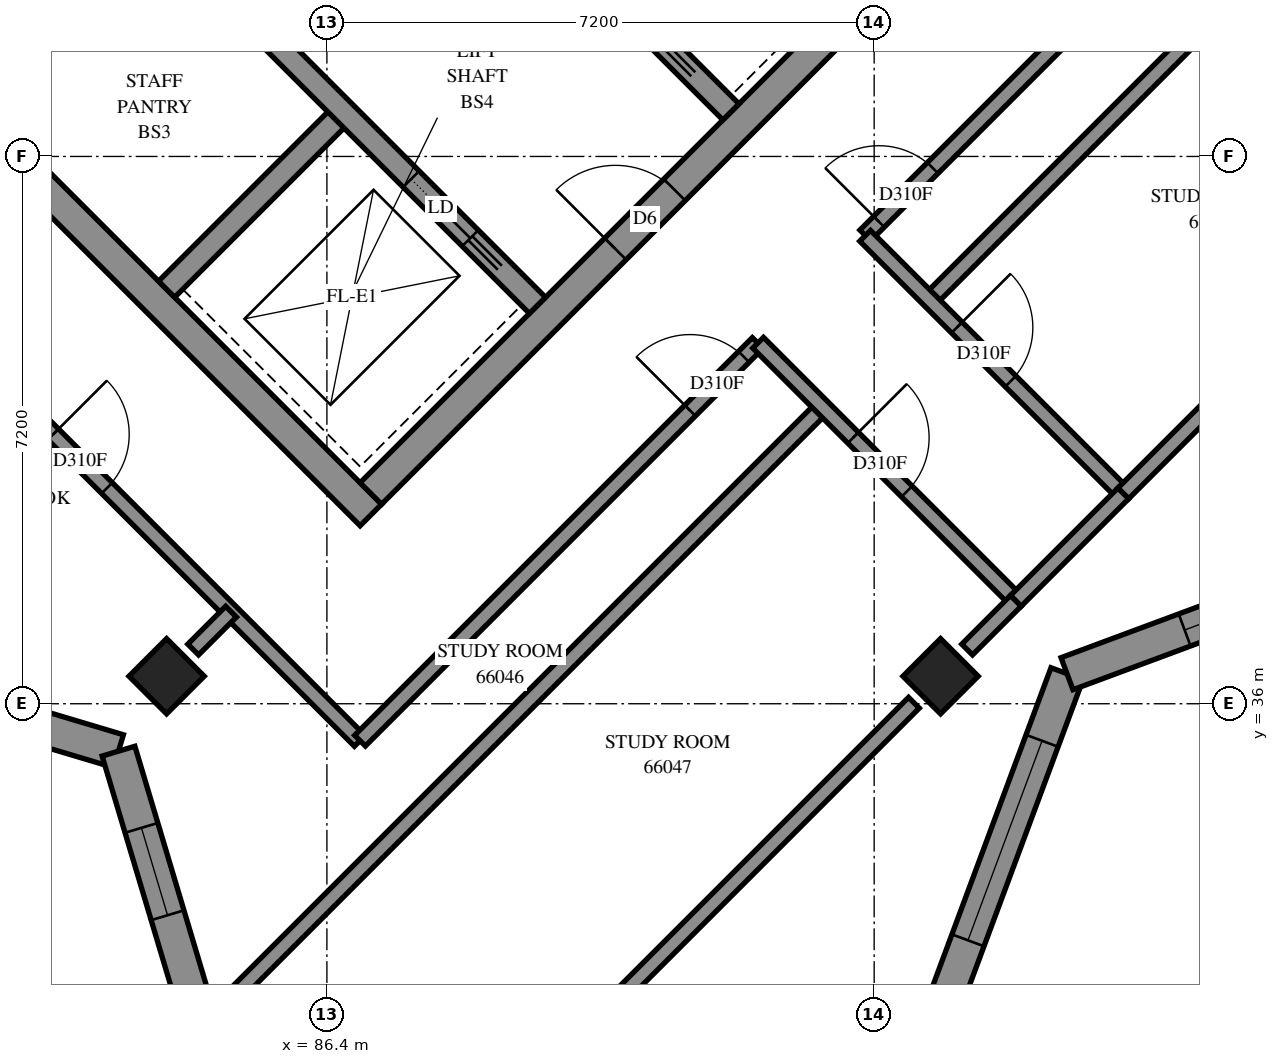
"""IFC4 building model, lengths in metres.
Left out: names, types, materials, properties, quantities, classifications, styles, units other than length and angle.
Written with IfcOpenShell. Run it as: python <this file> out.ifc"""

import sys

from ifc_helpers import new_model, si_unit, direction, frame, frame_2d, origin, origin_2d, place, context, subcontext, project, spatial, polyline, rectangle, outline, extrude, element, fill, save


model = new_model("IFC4")
c1 = context("Model", 3, precision=1e-05, world=origin(), true_north=direction((0.0, 1.0)))
c2 = subcontext(c1, "Body", "Model", "MODEL_VIEW")
j1 = project(units=[si_unit("LENGTHUNIT", "METRE"), si_unit("PLANEANGLEUNIT", "RADIAN")], contexts=[c1])
p1 = place(None, origin())
s1 = spatial("IfcSite", under=j1, at=p1, CompositionType="ELEMENT")
p2 = place(p1, origin())
s2 = spatial("IfcBuilding", under=s1, at=p2, CompositionType="ELEMENT")
p3 = place(p2, frame((0.0, 0.0, 243.8)))
s3 = spatial("IfcBuildingStorey", under=s2, at=p3, CompositionType="ELEMENT", Elevation=243.8)
for number, where, z_axis, x_axis in (
    (1, (84.291, 36.362, 0.0), (0.0, 0.0, 1.0), (0.707, -0.707, 0.0)),
    (2, (94.474, 36.362, 0.0), (0.0, 0.0, 1.0), (0.707, -0.707, 0.0)),
):
    element("IfcColumn", number, at=place(p3, frame(where, z_axis=z_axis, x_axis=x_axis)), inside=s3, PredefinedType="COLUMN", context=c2, shape_type="SweptSolid", body=[
        extrude(rectangle(XDim=0.7, YDim=0.7, at=origin_2d()), origin(), (0.0, 0.0, 1.0), 3.1),
    ])
p4 = place(p3, frame((76.23, 49.231, -0.3), z_axis=(0.0, 0.0, 1.0), x_axis=(0.7071034917, -0.7071100706, 0.0)))
e3 = element("IfcWall", 3, at=p4, inside=s3, PredefinedType="SHEAR", context=c2, shape_type="SweptSolid", body=[
    extrude(rectangle(XDim=15.2, YDim=0.4, at=frame_2d((7.6, 0.0))), origin(), (0.0, 0.0, 1.0), 2.7),
])
p5 = place(p3, frame((86.978, 38.766, -0.3), z_axis=(0.0, 0.0, 1.0), x_axis=(0.7071067812, 0.7071067812, 0.0)))
e4 = element("IfcWall", 4, at=p5, inside=s3, PredefinedType="SHEAR", context=c2, shape_type="SweptSolid", body=[
    extrude(rectangle(XDim=14.4, YDim=0.4, at=frame_2d((7.2, 0.0))), origin(), (0.0, 0.0, 1.0), 2.7),
])
p6 = place(p5, frame((4.55, 0.0, 0.3)))
e5 = element("IfcOpeningElement", 5, at=p6, cuts=e4, PredefinedType="OPENING", context=c2, shape_type="SweptSolid", body=[
    extrude(rectangle(XDim=1.1, YDim=2.1, at=frame_2d((0.55, 1.05))), frame((0.0, 0.21, 0.0), z_axis=(0.0, -1.0, 0.0), x_axis=(1.0, 0.0, 0.0)), (0.0, 0.0, 1.0), 0.42),
])
p7 = place(p5, frame((11.35, 0.0, 0.3)))
e6 = element("IfcOpeningElement", 6, at=p7, cuts=e4, PredefinedType="OPENING", context=c2, shape_type="SweptSolid", body=[
    extrude(rectangle(XDim=1.1, YDim=2.1, at=frame_2d((0.55, 1.05))), frame((0.0, 0.21, 0.0), z_axis=(0.0, -1.0, 0.0), x_axis=(1.0, 0.0, 0.0)), (0.0, 0.0, 1.0), 0.42),
])
for number, where, z_axis, x_axis in (
    (7, (81.746, 43.999, 0.0), (0.0, 0.0, 1.0), (0.707, 0.707, 0.0)),
    (8, (84.291, 41.453, 0.0), (0.0, 0.0, 1.0), (0.707, 0.707, 0.0)),
):
    element("IfcWall", number, at=place(p3, frame(where, z_axis=z_axis, x_axis=x_axis)), inside=s3, PredefinedType="SOLIDWALL", context=c2, shape_type="SweptSolid", body=[
        extrude(rectangle(XDim=3.3, YDim=0.3, at=frame_2d((1.65, 0.0))), origin(), (0.0, 0.0, 1.0), 3.1),
    ])
p8 = place(p3, frame((78.988, 51.423, 0.0), z_axis=(0.0, 0.0, 1.0), x_axis=(0.7071067812, -0.7071067812, 0.0)))
e9 = element("IfcWall", 9, at=p8, inside=s3, PredefinedType="SOLIDWALL", context=c2, shape_type="SweptSolid", body=[
    extrude(rectangle(XDim=14.4, YDim=0.3, at=frame_2d((7.2, 0.0))), origin(), (0.0, 0.0, 1.0), 3.1),
])
p9 = place(p8, frame((1.35, 0.0, 0.0)))
e10 = element("IfcOpeningElement", 10, at=p9, cuts=e9, PredefinedType="OPENING", context=c2, shape_type="SweptSolid", body=[
    extrude(rectangle(XDim=0.9, YDim=2.1, at=frame_2d((0.45, 1.05))), frame((0.0, 0.16, 0.0), z_axis=(0.0, -1.0, 0.0), x_axis=(1.0, 0.0, 0.0)), (0.0, 0.0, 1.0), 0.32),
])
p10 = place(p8, frame((4.95, 0.0, 0.0)))
e11 = element("IfcOpeningElement", 11, at=p10, cuts=e9, PredefinedType="OPENING", context=c2, shape_type="SweptSolid", body=[
    extrude(rectangle(XDim=0.9, YDim=2.1, at=frame_2d((0.45, 1.05))), frame((0.0, 0.16, 0.0), z_axis=(0.0, -1.0, 0.0), x_axis=(1.0, 0.0, 0.0)), (0.0, 0.0, 1.0), 0.32),
])
p11 = place(p8, frame((8.55, 0.0, 0.0)))
e12 = element("IfcOpeningElement", 12, at=p11, cuts=e9, PredefinedType="OPENING", context=c2, shape_type="SweptSolid", body=[
    extrude(rectangle(XDim=0.9, YDim=2.1, at=frame_2d((0.45, 1.05))), frame((0.0, 0.16, 0.0), z_axis=(0.0, -1.0, 0.0), x_axis=(1.0, 0.0, 0.0)), (0.0, 0.0, 1.0), 0.32),
])
p12 = place(p8, frame((12.05, 0.0, 0.0)))
e13 = element("IfcOpeningElement", 13, at=p12, cuts=e9, PredefinedType="OPENING", context=c2, shape_type="SweptSolid", body=[
    extrude(rectangle(XDim=1.1, YDim=2.1, at=frame_2d((0.55, 1.05))), frame((0.0, 0.16, 0.0), z_axis=(0.0, -1.0, 0.0), x_axis=(1.0, 0.0, 0.0)), (0.0, 0.0, 1.0), 0.32),
])
p13 = place(p3, frame((81.534, 53.969, 0.0), z_axis=(0.0, 0.0, 1.0), x_axis=(0.707103309, -0.7071102534, 0.0)))
e14 = element("IfcWall", 14, at=p13, inside=s3, PredefinedType="SOLIDWALL", context=c2, shape_type="SweptSolid", body=[
    extrude(rectangle(XDim=14.4, YDim=0.3, at=frame_2d((7.2, 0.0))), origin(), (0.0, 0.0, 1.0), 3.1),
])
p14 = place(p13, frame((8.55, 0.0, 0.0)))
e15 = element("IfcOpeningElement", 15, at=p14, cuts=e14, PredefinedType="OPENING", context=c2, shape_type="SweptSolid", body=[
    extrude(rectangle(XDim=0.9, YDim=2.1, at=frame_2d((0.45, 1.05))), frame((0.0, 0.16, 0.0), z_axis=(0.0, -1.0, 0.0), x_axis=(1.0, 0.0, 0.0)), (0.0, 0.0, 1.0), 0.32),
])
p15 = place(p13, frame((1.25, 0.0, 0.0)))
e16 = element("IfcOpeningElement", 16, at=p15, cuts=e14, PredefinedType="OPENING", context=c2, shape_type="SweptSolid", body=[
    extrude(rectangle(XDim=1.1, YDim=2.1, at=frame_2d((0.55, 1.05))), frame((0.0, 0.16, 0.0), z_axis=(0.0, -1.0, 0.0), x_axis=(1.0, 0.0, 0.0)), (0.0, 0.0, 1.0), 0.32),
])
p16 = place(p13, frame((4.85, 0.0, 0.0)))
e17 = element("IfcOpeningElement", 17, at=p16, cuts=e14, PredefinedType="OPENING", context=c2, shape_type="SweptSolid", body=[
    extrude(rectangle(XDim=1.1, YDim=2.1, at=frame_2d((0.55, 1.05))), frame((0.0, 0.16, 0.0), z_axis=(0.0, -1.0, 0.0), x_axis=(1.0, 0.0, 0.0)), (0.0, 0.0, 1.0), 0.32),
])
p17 = place(p13, frame((12.05, 0.0, 0.0)))
e18 = element("IfcOpeningElement", 18, at=p17, cuts=e14, PredefinedType="OPENING", context=c2, shape_type="SweptSolid", body=[
    extrude(rectangle(XDim=1.1, YDim=2.1, at=frame_2d((0.55, 1.05))), frame((0.0, 0.16, 0.0), z_axis=(0.0, -1.0, 0.0), x_axis=(1.0, 0.0, 0.0)), (0.0, 0.0, 1.0), 0.32),
])
p18 = place(p3, frame((94.3, 31.45, 0.0), z_axis=(0.0, 0.0, 1.0), x_axis=(0.3481927166, 0.9374229739, 0.0)))
e19 = element("IfcWall", 19, at=p18, inside=s3, PredefinedType="SOLIDWALL", context=c2, shape_type="SweptSolid", body=[
    extrude(outline(polyline([(-0.108, -0.225), (5.172, -0.225), (5.379, 0.225), (0.108, 0.225), (-0.108, -0.225)])), origin(), (0.0, 0.0, 1.0), 3.1),
])
p19 = place(p18, frame((1.534, 0.0, 0.45)))
e20 = element("IfcOpeningElement", 20, at=p19, cuts=e19, PredefinedType="OPENING", context=c2, shape_type="SweptSolid", body=[
    extrude(rectangle(XDim=2.8, YDim=2.55, at=frame_2d((1.4, 1.275))), frame((0.0, 0.235, 0.0), z_axis=(0.0, -1.0, 0.0), x_axis=(1.0, 0.0, 0.0)), (0.0, 0.0, 1.0), 0.47),
])
p20 = place(p3, frame((96.137, 36.395, 0.0), z_axis=(0.0, 0.0, 1.0), x_axis=(0.937429161, 0.3481760591, 0.0)))
e21 = element("IfcWall", 21, at=p20, inside=s3, PredefinedType="SOLIDWALL", context=c2, shape_type="SweptSolid", body=[
    extrude(outline(polyline([(0.103, -0.225), (5.383, -0.225), (5.168, 0.225), (-0.103, 0.225), (0.103, -0.225)])), origin(), (0.0, 0.0, 1.0), 3.1),
])
p21 = place(p20, frame((1.651, 0.0, 0.45)))
e22 = element("IfcOpeningElement", 22, at=p21, cuts=e21, PredefinedType="OPENING", context=c2, shape_type="SweptSolid", body=[
    extrude(rectangle(XDim=2.8, YDim=2.55, at=frame_2d((1.4, 1.275))), frame((0.0, 0.235, 0.0), z_axis=(0.0, -1.0, 0.0), x_axis=(1.0, 0.0, 0.0)), (0.0, 0.0, 1.0), 0.47),
])
p22 = place(p3, frame((79.227, 36.701, 0.0), z_axis=(0.0, 0.0, 1.0), x_axis=(0.9581351334, -0.2863163742, 0.0)))
e23 = element("IfcWall", 23, at=p22, inside=s3, PredefinedType="SOLIDWALL", context=c2, shape_type="SweptSolid", body=[
    extrude(outline(polyline([(-0.127, -0.225), (4.504, -0.225), (4.747, 0.225), (0.127, 0.225), (-0.127, -0.225)])), origin(), (0.0, 0.0, 1.0), 3.1),
])
p23 = place(p22, frame((0.628, 0.0, 0.45)))
e24 = element("IfcOpeningElement", 24, at=p23, cuts=e23, PredefinedType="OPENING", context=c2, shape_type="SweptSolid", body=[
    extrude(rectangle(XDim=2.8, YDim=2.55, at=frame_2d((1.4, 1.275))), frame((0.0, 0.235, 0.0), z_axis=(0.0, -1.0, 0.0), x_axis=(1.0, 0.0, 0.0)), (0.0, 0.0, 1.0), 0.47),
])
p24 = place(p3, frame((83.659, 35.376, 0.0), z_axis=(0.0, 0.0, 1.0), x_axis=(0.2863163742, -0.9581351334, 0.0)))
e25 = element("IfcWall", 25, at=p24, inside=s3, PredefinedType="SOLIDWALL", context=c2, shape_type="SweptSolid", body=[
    extrude(outline(polyline([(0.121, -0.225), (4.753, -0.225), (4.499, 0.225), (-0.121, 0.225), (0.121, -0.225)])), origin(), (0.0, 0.0, 1.0), 3.1),
])
p25 = place(p24, frame((1.053, 0.0, 0.45)))
e26 = element("IfcOpeningElement", 26, at=p25, cuts=e25, PredefinedType="OPENING", context=c2, shape_type="SweptSolid", body=[
    extrude(rectangle(XDim=1.2, YDim=2.55, at=frame_2d((0.6, 1.275))), frame((0.0, 0.235, 0.0), z_axis=(0.0, -1.0, 0.0), x_axis=(1.0, 0.0, 0.0)), (0.0, 0.0, 1.0), 0.47),
])
p26 = place(p3, frame((84.929, 31.91, 0.0), z_axis=(0.0, 0.0, 1.0), x_axis=(0.7071067812, 0.7071067812, 0.0)))
e27 = element("IfcWall", 27, at=p26, inside=s3, PredefinedType="PARTITIONING", context=c2, shape_type="SweptSolid", body=[
    extrude(rectangle(XDim=11.297, YDim=0.2, at=frame_2d((5.649, 0.0))), origin(), (0.0, 0.0, 1.0), 3.1),
])
p27 = place(p3, frame((93.483, 42.161, 0.0), z_axis=(0.0, 0.0, 1.0), x_axis=(0.7071067812, 0.7071067812, 0.0)))
e28 = element("IfcWall", 28, at=p27, inside=s3, PredefinedType="PARTITIONING", context=c2, shape_type="SweptSolid", body=[
    extrude(rectangle(XDim=9.8, YDim=0.2, at=frame_2d((4.9, 0.0))), origin(), (0.0, 0.0, 1.0), 3.1),
])
p28 = place(p27, frame((0.255, 0.0, 0.0)))
e29 = element("IfcOpeningElement", 29, at=p28, cuts=e28, PredefinedType="OPENING", context=c2, shape_type="SweptSolid", body=[
    extrude(rectangle(XDim=1.0, YDim=2.1, at=frame_2d((0.5, 1.05))), frame((0.0, 0.11, 0.0), z_axis=(0.0, -1.0, 0.0), x_axis=(1.0, 0.0, 0.0)), (0.0, 0.0, 1.0), 0.22),
])
p29 = place(p3, frame((80.747, 41.597, 0.0), z_axis=(0.0, 0.0, 1.0), x_axis=(0.7071067812, -0.7071067812, 0.0)))
e30 = element("IfcWall", 30, at=p29, inside=s3, PredefinedType="PARTITIONING", context=c2, shape_type="SweptSolid", body=[
    extrude(rectangle(XDim=8.607, YDim=0.2, at=frame_2d((4.303, 0.0))), origin(), (0.0, 0.0, 1.0), 3.1),
])
p30 = place(p29, frame((2.903, 0.0, 0.0)))
e31 = element("IfcOpeningElement", 31, at=p30, cuts=e30, PredefinedType="OPENING", context=c2, shape_type="SweptSolid", body=[
    extrude(rectangle(XDim=1.0, YDim=2.1, at=frame_2d((0.5, 1.05))), frame((0.0, 0.11, 0.0), z_axis=(0.0, -1.0, 0.0), x_axis=(1.0, 0.0, 0.0)), (0.0, 0.0, 1.0), 0.22),
])
p31 = place(p3, frame((86.836, 35.514, 0.0), z_axis=(0.0, 0.0, 1.0), x_axis=(0.7071067812, 0.7071067812, 0.0)))
e32 = element("IfcWall", 32, at=p31, inside=s3, PredefinedType="PARTITIONING", context=c2, shape_type="SweptSolid", body=[
    extrude(rectangle(XDim=7.399, YDim=0.2, at=frame_2d((3.7, 0.0))), origin(), (0.0, 0.0, 1.0), 3.1),
])
p32 = place(p31, frame((6.142, 0.0, 0.0)))
e33 = element("IfcOpeningElement", 33, at=p32, cuts=e32, PredefinedType="OPENING", context=c2, shape_type="SweptSolid", body=[
    extrude(rectangle(XDim=1.0, YDim=2.1, at=frame_2d((0.5, 1.05))), frame((0.0, 0.11, 0.0), z_axis=(0.0, -1.0, 0.0), x_axis=(1.0, 0.0, 0.0)), (0.0, 0.0, 1.0), 0.22),
])
p33 = place(p3, frame((94.331, 41.313, 0.0), z_axis=(0.0, 0.0, 1.0), x_axis=(0.7071139756, 0.7070995867, 0.0)))
e34 = element("IfcWall", 34, at=p33, inside=s3, PredefinedType="PARTITIONING", context=c2, shape_type="SweptSolid", body=[
    extrude(rectangle(XDim=6.95, YDim=0.2, at=frame_2d((3.475, 0.0))), origin(), (0.0, 0.0, 1.0), 3.1),
])
p34 = place(p3, frame((89.731, 31.621, 0.0), z_axis=(0.0, 0.0, 1.0), x_axis=(0.7071067812, 0.7071067812, 0.0)))
e35 = element("IfcWall", 35, at=p34, inside=s3, PredefinedType="PARTITIONING", context=c2, shape_type="SweptSolid", body=[
    extrude(rectangle(XDim=6.211, YDim=0.2, at=frame_2d((3.106, 0.0))), origin(), (0.0, 0.0, 1.0), 2.6),
])
p35 = place(p3, frame((93.481, 42.157, 0.0), z_axis=(0.0, 0.0, 1.0), x_axis=(0.7071067812, -0.7071067812, 0.0)))
e36 = element("IfcWall", 36, at=p35, inside=s3, PredefinedType="PARTITIONING", context=c2, shape_type="SweptSolid", body=[
    extrude(rectangle(XDim=4.8, YDim=0.2, at=frame_2d((2.4, 0.0))), origin(), (0.0, 0.0, 1.0), 3.1),
])
p36 = place(p35, frame((1.707, 0.0, 0.0)))
e37 = element("IfcOpeningElement", 37, at=p36, cuts=e36, PredefinedType="OPENING", context=c2, shape_type="SweptSolid", body=[
    extrude(rectangle(XDim=1.0, YDim=2.1, at=frame_2d((0.5, 1.05))), frame((0.0, 0.11, 0.0), z_axis=(0.0, -1.0, 0.0), x_axis=(1.0, 0.0, 0.0)), (0.0, 0.0, 1.0), 0.22),
])
p37 = place(p3, frame((92.073, 40.749, 0.0), z_axis=(0.0, 0.0, 1.0), x_axis=(0.7071067812, -0.7071067812, 0.0)))
e38 = element("IfcWall", 38, at=p37, inside=s3, PredefinedType="PARTITIONING", context=c2, shape_type="SweptSolid", body=[
    extrude(rectangle(XDim=4.8, YDim=0.2, at=frame_2d((2.4, 0.0))), origin(), (0.0, 0.0, 1.0), 3.1),
])
p38 = place(p37, frame((1.767, 0.0, 0.0)))
e39 = element("IfcOpeningElement", 39, at=p38, cuts=e38, PredefinedType="OPENING", context=c2, shape_type="SweptSolid", body=[
    extrude(rectangle(XDim=1.0, YDim=2.1, at=frame_2d((0.5, 1.05))), frame((0.0, 0.11, 0.0), z_axis=(0.0, -1.0, 0.0), x_axis=(1.0, 0.0, 0.0)), (0.0, 0.0, 1.0), 0.22),
])
p39 = place(p3, frame((96.877, 38.767, 0.0), z_axis=(0.0, 0.0, 1.0), x_axis=(0.7071067812, 0.7071067812, 0.0)))
e40 = element("IfcWall", 40, at=p39, inside=s3, PredefinedType="PARTITIONING", context=c2, shape_type="SweptSolid", body=[
    extrude(rectangle(XDim=3.306, YDim=0.2, at=frame_2d((1.653, 0.0))), origin(), (0.0, 0.0, 1.0), 2.6),
])
p40 = place(p3, frame((95.463, 37.353, 0.0), z_axis=(0.0, 0.0, 1.0), x_axis=(0.7071067812, 0.7071067812, 0.0)))
e41 = element("IfcWall", 41, at=p40, inside=s3, PredefinedType="PARTITIONING", context=c2, shape_type="SweptSolid", body=[
    extrude(rectangle(XDim=2.0, YDim=0.2, at=frame_2d((1.0, 0.0))), origin(), (0.0, 0.0, 1.0), 2.6),
])
p41 = place(p3, frame((94.823, 36.713, 0.0), z_axis=(0.0, 0.0, 1.0), x_axis=(0.7071067812, 0.7071067812, 0.0)))
e42 = element("IfcWall", 42, at=p41, inside=s3, PredefinedType="PARTITIONING", context=c2, shape_type="SweptSolid", body=[
    extrude(rectangle(XDim=0.905, YDim=0.2, at=frame_2d((0.453, 0.0))), origin(), (0.0, 0.0, 1.0), 2.6),
])
p42 = place(p3, frame((84.641, 36.713, 0.0), z_axis=(0.0, 0.0, 1.0), x_axis=(0.7071067812, 0.7071067812, 0.0)))
e43 = element("IfcWall", 43, at=p42, inside=s3, PredefinedType="PARTITIONING", context=c2, shape_type="SweptSolid", body=[
    extrude(rectangle(XDim=0.704, YDim=0.2, at=frame_2d((0.352, 0.0))), origin(), (0.0, 0.0, 1.0), 3.1),
])
p43 = place(p19, origin())
e44 = element("IfcWindow", 44, at=p43, inside=s3, PartitioningType="SINGLE_PANEL", PredefinedType="WINDOW", context=c2, shape_type="SweptSolid", body=[
    extrude(rectangle(XDim=2.8, YDim=2.55, at=frame_2d((1.4, 1.275))), frame((0.0, 0.205, 0.0), z_axis=(0.0, -1.0, 0.0), x_axis=(1.0, 0.0, 0.0)), (0.0, 0.0, 1.0), 0.06),
])
fill(e20, e44)
p44 = place(p21, origin())
e45 = element("IfcWindow", 45, at=p44, inside=s3, PartitioningType="SINGLE_PANEL", PredefinedType="WINDOW", context=c2, shape_type="SweptSolid", body=[
    extrude(rectangle(XDim=2.8, YDim=2.55, at=frame_2d((1.4, 1.275))), frame((0.0, 0.205, 0.0), z_axis=(0.0, -1.0, 0.0), x_axis=(1.0, 0.0, 0.0)), (0.0, 0.0, 1.0), 0.06),
])
fill(e22, e45)
p45 = place(p25, origin())
e46 = element("IfcWindow", 46, at=p45, inside=s3, PartitioningType="SINGLE_PANEL", PredefinedType="WINDOW", context=c2, shape_type="SweptSolid", body=[
    extrude(rectangle(XDim=1.2, YDim=2.55, at=frame_2d((0.6, 1.275))), frame((0.0, 0.205, 0.0), z_axis=(0.0, -1.0, 0.0), x_axis=(1.0, 0.0, 0.0)), (0.0, 0.0, 1.0), 0.06),
])
fill(e26, e46)
p46 = place(p6, origin())
e47 = element("IfcDoor", 47, at=p46, inside=s3, OperationType="DOUBLE_DOOR_SINGLE_SWING", PredefinedType="DOOR", context=c2, shape_type="SweptSolid", body=[
    extrude(rectangle(XDim=1.1, YDim=2.1, at=frame_2d((0.55, 1.05))), frame((0.0, 0.025, 0.0), z_axis=(0.0, -1.0, 0.0), x_axis=(1.0, 0.0, 0.0)), (0.0, 0.0, 1.0), 0.05),
])
fill(e5, e47)
p47 = place(p12, origin())
e48 = element("IfcDoor", 48, at=p47, inside=s3, OperationType="SLIDING_TO_RIGHT", PredefinedType="DOOR", context=c2, shape_type="SweptSolid", body=[
    extrude(rectangle(XDim=1.1, YDim=2.1, at=frame_2d((0.55, 1.05))), frame((0.0, 0.025, 0.0), z_axis=(0.0, -1.0, 0.0), x_axis=(1.0, 0.0, 0.0)), (0.0, 0.0, 1.0), 0.05),
])
fill(e13, e48)
p48 = place(p28, origin())
e49 = element("IfcDoor", 49, at=p48, inside=s3, OperationType="SINGLE_SWING_RIGHT", PredefinedType="DOOR", context=c2, shape_type="SweptSolid", body=[
    extrude(rectangle(XDim=1.0, YDim=2.1, at=frame_2d((0.5, 1.05))), frame((0.0, 0.025, 0.0), z_axis=(0.0, -1.0, 0.0), x_axis=(1.0, 0.0, 0.0)), (0.0, 0.0, 1.0), 0.05),
])
fill(e29, e49)
p49 = place(p30, origin())
e50 = element("IfcDoor", 50, at=p49, inside=s3, OperationType="SINGLE_SWING_RIGHT", PredefinedType="DOOR", context=c2, shape_type="SweptSolid", body=[
    extrude(rectangle(XDim=1.0, YDim=2.1, at=frame_2d((0.5, 1.05))), frame((0.0, 0.025, 0.0), z_axis=(0.0, -1.0, 0.0), x_axis=(1.0, 0.0, 0.0)), (0.0, 0.0, 1.0), 0.05),
])
fill(e31, e50)
p50 = place(p32, origin())
e51 = element("IfcDoor", 51, at=p50, inside=s3, OperationType="SINGLE_SWING_RIGHT", PredefinedType="DOOR", context=c2, shape_type="SweptSolid", body=[
    extrude(rectangle(XDim=1.0, YDim=2.1, at=frame_2d((0.5, 1.05))), frame((0.0, 0.025, 0.0), z_axis=(0.0, -1.0, 0.0), x_axis=(1.0, 0.0, 0.0)), (0.0, 0.0, 1.0), 0.05),
])
fill(e33, e51)
p51 = place(p38, origin())
e52 = element("IfcDoor", 52, at=p51, inside=s3, OperationType="SINGLE_SWING_LEFT", PredefinedType="DOOR", context=c2, shape_type="SweptSolid", body=[
    extrude(rectangle(XDim=1.0, YDim=2.1, at=frame_2d((0.5, 1.05))), frame((0.0, 0.025, 0.0), z_axis=(0.0, -1.0, 0.0), x_axis=(1.0, 0.0, 0.0)), (0.0, 0.0, 1.0), 0.05),
])
fill(e39, e52)
p52 = place(p36, origin())
e53 = element("IfcDoor", 53, at=p52, inside=s3, OperationType="SINGLE_SWING_RIGHT", PredefinedType="DOOR", context=c2, shape_type="SweptSolid", body=[
    extrude(rectangle(XDim=1.0, YDim=2.1, at=frame_2d((0.5, 1.05))), frame((0.0, 0.025, 0.0), z_axis=(0.0, -1.0, 0.0), x_axis=(1.0, 0.0, 0.0)), (0.0, 0.0, 1.0), 0.05),
])
fill(e37, e53)
save(model, sys.argv[1])
